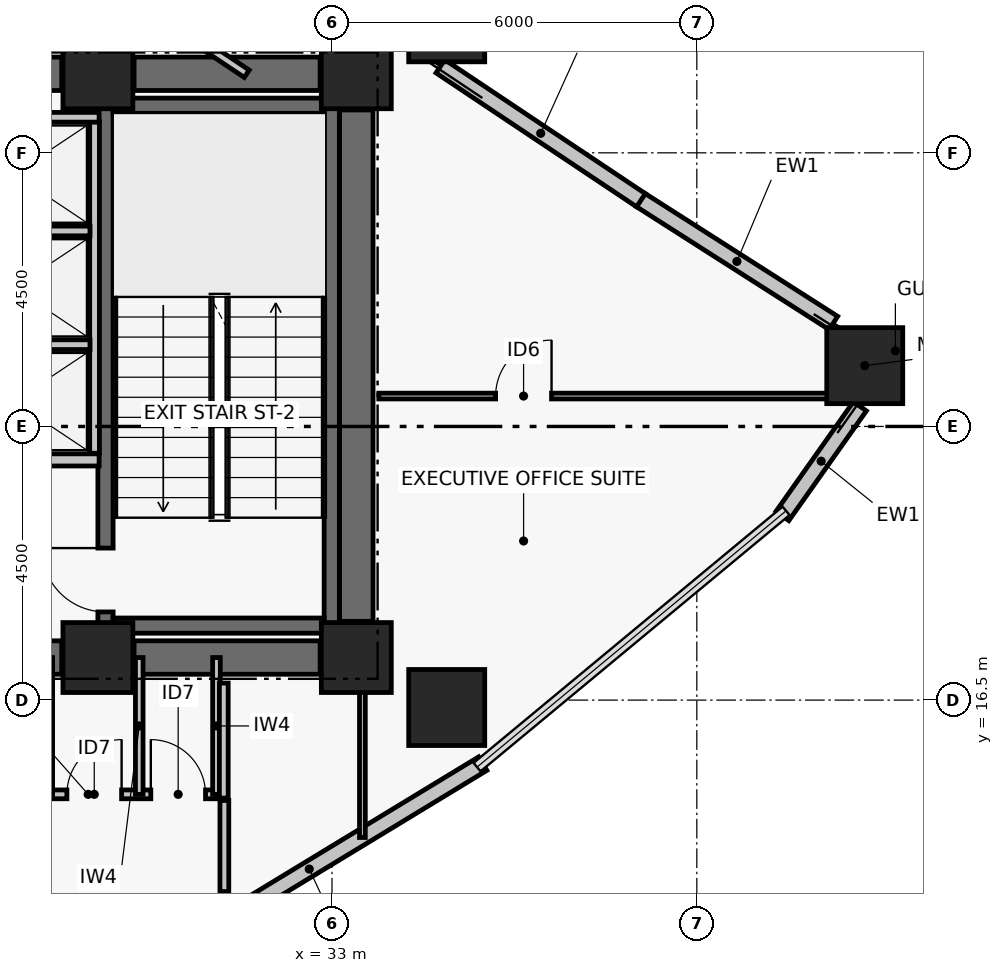
"""IFC4 building model, lengths in metres.
Left out: names, types, materials, properties, quantities, classifications, styles, units other than length and angle.
Written with IfcOpenShell. Run it as: python <this file> out.ifc"""

import sys

from ifc_helpers import new_model, si_unit, direction, frame, frame_2d, origin, origin_2d, place, context, subcontext, project, spatial, rectangle, hollow_rectangle, extrude, element, fill, save


model = new_model("IFC4")
c1 = context("Model", 3, precision=1e-05, world=origin(), true_north=direction((0.0, 1.0)))
c2 = subcontext(c1, "Body", "Model", "MODEL_VIEW")
j1 = project(units=[si_unit("LENGTHUNIT", "METRE"), si_unit("PLANEANGLEUNIT", "RADIAN")], contexts=[c1])
p1 = place(None, origin())
s1 = spatial("IfcSite", under=j1, at=p1, CompositionType="ELEMENT")
p2 = place(p1, origin())
s2 = spatial("IfcBuilding", under=s1, at=p2, CompositionType="ELEMENT")
p3 = place(p2, frame((0.0, 0.0, 111.42)))
s3 = spatial("IfcBuildingStorey", under=s2, at=p3, CompositionType="ELEMENT", Elevation=111.42)
for number, where, z_axis, x_axis in (
    (1, (29.15, 17.2, 0.0), (0.0, 0.0, 1.0), (1.0, 0.0, 0.0)),
    (2, (33.4, 17.2, 0.0), (0.0, 0.0, 1.0), (1.0, 0.0, 0.0)),
    (3, (29.15, 26.8, 0.0), (0.0, 0.0, 1.0), (1.0, 0.0, 0.0)),
    (4, (33.4, 26.8, 0.0), (0.0, 0.0, 1.0), (1.0, 0.0, 0.0)),
):
    element("IfcColumn", number, at=place(p3, frame(where, z_axis=z_axis, x_axis=x_axis)), inside=s3, PredefinedType="COLUMN", context=c2, shape_type="SweptSolid", body=[
        extrude(rectangle(XDim=1.15, YDim=1.15, at=origin_2d()), origin(), (0.0, 0.0, 1.0), 3.72),
    ])
p4 = place(p3, frame((26.85, 17.2, 0.0), z_axis=(0.0, 0.0, 1.0), x_axis=(1.0, 0.0, 0.0)))
e5 = element("IfcWall", 5, at=p4, inside=s3, PredefinedType="SHEAR", context=c2, shape_type="SweptSolid", body=[
    extrude(rectangle(XDim=1.705, YDim=0.55, at=frame_2d((0.853, 0.0))), origin(), (0.0, 0.0, 1.0), 3.47),
])
p5 = place(p3, frame((29.745, 17.2, 0.0), z_axis=(0.0, 0.0, 1.0), x_axis=(1.0, 0.0, 0.0)))
e6 = element("IfcWall", 6, at=p5, inside=s3, PredefinedType="SHEAR", context=c2, shape_type="SweptSolid", body=[
    extrude(rectangle(XDim=3.06, YDim=0.55, at=frame_2d((1.53, 0.0))), origin(), (0.0, 0.0, 1.0), 3.47),
])
p6 = place(p3, frame((26.85, 26.8, 0.0), z_axis=(0.0, 0.0, 1.0), x_axis=(1.0, 0.0, 0.0)))
e7 = element("IfcWall", 7, at=p6, inside=s3, PredefinedType="SHEAR", context=c2, shape_type="SweptSolid", body=[
    extrude(rectangle(XDim=1.705, YDim=0.55, at=frame_2d((0.853, 0.0))), origin(), (0.0, 0.0, 1.0), 3.47),
])
p7 = place(p3, frame((29.745, 26.8, 0.0), z_axis=(0.0, 0.0, 1.0), x_axis=(1.0, 0.0, 0.0)))
e8 = element("IfcWall", 8, at=p7, inside=s3, PredefinedType="SHEAR", context=c2, shape_type="SweptSolid", body=[
    extrude(rectangle(XDim=3.06, YDim=0.55, at=frame_2d((1.53, 0.0))), origin(), (0.0, 0.0, 1.0), 3.47),
])
p8 = place(p3, frame((33.4, 17.795, 0.0), z_axis=(0.0, 0.0, 1.0), x_axis=(0.0, 1.0, 0.0)))
e9 = element("IfcWall", 9, at=p8, inside=s3, PredefinedType="SHEAR", context=c2, shape_type="SweptSolid", body=[
    extrude(rectangle(XDim=8.41, YDim=0.55, at=frame_2d((4.205, 0.0))), origin(), (0.0, 0.0, 1.0), 3.47),
])
p9 = place(p3, frame((29.275, 17.6, 0.0), z_axis=(0.0, 0.0, 1.0), x_axis=(0.0, 1.0, 0.0)))
e10 = element("IfcWall", 10, at=p9, inside=s3, PredefinedType="SHEAR", context=c2, shape_type="SweptSolid", body=[
    extrude(rectangle(XDim=8.8, YDim=0.25, at=frame_2d((4.4, 0.0))), origin(), (0.0, 0.0, 1.0), 3.47),
])
p10 = place(p9, frame((0.35, 0.0, 0.0)))
e11 = element("IfcOpeningElement", 11, at=p10, cuts=e10, PredefinedType="OPENING", context=c2, shape_type="SweptSolid", body=[
    extrude(rectangle(XDim=1.05, YDim=2.08, at=frame_2d((0.525, 1.04))), frame((0.0, 0.135, 0.0), z_axis=(0.0, -1.0, 0.0), x_axis=(1.0, 0.0, 0.0)), (0.0, 0.0, 1.0), 0.27),
])
p11 = place(p3, frame((32.996, 17.6, 0.0), z_axis=(0.0, 0.0, 1.0), x_axis=(0.0, 1.0, 0.0)))
e12 = element("IfcWall", 12, at=p11, inside=s3, PredefinedType="SHEAR", context=c2, shape_type="SweptSolid", body=[
    extrude(rectangle(XDim=8.8, YDim=0.25, at=frame_2d((4.4, 0.0))), origin(), (0.0, 0.0, 1.0), 3.47),
])
for number, where, z_axis, x_axis in (
    (13, (29.4, 17.725, 0.0), (0.0, 0.0, 1.0), (1.0, 0.0, 0.0)),
    (14, (29.4, 26.275, 0.0), (0.0, 0.0, 1.0), (1.0, 0.0, 0.0)),
):
    element("IfcWall", number, at=place(p3, frame(where, z_axis=z_axis, x_axis=x_axis)), inside=s3, PredefinedType="SHEAR", context=c2, shape_type="SweptSolid", body=[
        extrude(rectangle(XDim=3.471, YDim=0.25, at=frame_2d((1.736, 0.0))), origin(), (0.0, 0.0, 1.0), 3.47),
    ])
for number, where, z_axis, x_axis in (
    (15, (41.762, 22.0, 0.0), (0.0, 0.0, 1.0), (1.0, 0.0, 0.0)),
    (16, (34.887, 27.622, 0.0), (0.0, 0.0, 1.0), (1.0, 0.0, 0.0)),
    (17, (34.887, 16.378, 0.0), (0.0, 0.0, 1.0), (1.0, 0.0, 0.0)),
):
    element("IfcColumn", number, at=place(p3, frame(where, z_axis=z_axis, x_axis=x_axis)), inside=s3, PredefinedType="COLUMN", context=c2, shape_type="SweptSolid", body=[
        extrude(hollow_rectangle(XDim=1.25, YDim=1.25, WallThickness=0.05, at=origin_2d()), origin(), (0.0, 0.0, 1.0), 3.72),
    ])
p12 = place(p3, frame((41.682, 21.331, 0.0), z_axis=(0.0, 0.0, 1.0), x_axis=(-0.577134204686, -0.816649318729, 0.0)))
e18 = element("IfcWall", 18, at=p12, inside=s3, PredefinedType="PARTITIONING", context=c2, shape_type="SweptSolid", body=[
    extrude(rectangle(XDim=2.21, YDim=0.26, at=frame_2d((1.105, 0.0))), origin(), (0.0, 0.0, 1.0), 3.47),
])
p13 = place(p3, frame((38.072, 24.727, 0.0), z_axis=(0.0, 0.0, 1.0), x_axis=(0.843033549628, -0.537860980367, 0.0)))
e19 = element("IfcWall", 19, at=p13, inside=s3, PredefinedType="PARTITIONING", context=c2, shape_type="SweptSolid", body=[
    extrude(rectangle(XDim=3.766, YDim=0.26, at=frame_2d((1.883, 0.0))), origin(), (0.0, 0.0, 1.0), 2.9),
])
p14 = place(p3, frame((34.783, 26.922, 0.0), z_axis=(0.0, 0.0, 1.0), x_axis=(0.831718676225, -0.555197301523, 0.0)))
e20 = element("IfcWall", 20, at=p14, inside=s3, PredefinedType="PARTITIONING", context=c2, shape_type="SweptSolid", body=[
    extrude(rectangle(XDim=3.966, YDim=0.26, at=frame_2d((1.983, 0.0))), origin(), (0.0, 0.0, 1.0), 2.77),
])
p15 = place(p3, frame((35.48, 15.455, 0.0), z_axis=(0.0, 0.0, 1.0), x_axis=(-0.854673977685, -0.51916509115, 0.0)))
e21 = element("IfcWall", 21, at=p15, inside=s3, PredefinedType="PARTITIONING", context=c2, shape_type="SweptSolid", body=[
    extrude(rectangle(XDim=6.678, YDim=0.26, at=frame_2d((3.339, 0.0))), origin(), (0.0, 0.0, 1.0), 3.47),
])
p16 = place(p3, frame((26.37, 20.45, 0.0), z_axis=(0.0, 0.0, 1.0), x_axis=(1.0, 0.0, 0.0)))
e22 = element("IfcWall", 22, at=p16, inside=s3, PredefinedType="PARTITIONING", context=c2, shape_type="SweptSolid", body=[
    extrude(rectangle(XDim=2.8, YDim=0.2, at=frame_2d((1.4, 0.0))), origin(), (0.0, 0.0, 1.0), 3.47),
])
p17 = place(p16, frame((0.78, 0.0, 0.0)))
e23 = element("IfcOpeningElement", 23, at=p17, cuts=e22, PredefinedType="OPENING", context=c2, shape_type="SweptSolid", body=[
    extrude(rectangle(XDim=1.1, YDim=2.08, at=frame_2d((0.55, 1.04))), frame((0.0, 0.11, 0.0), z_axis=(0.0, -1.0, 0.0), x_axis=(1.0, 0.0, 0.0)), (0.0, 0.0, 1.0), 0.22),
])
p18 = place(p3, frame((29.095, 20.56, 0.0), z_axis=(0.0, 0.0, 1.0), x_axis=(0.0, 1.0, 0.0)))
e24 = element("IfcWall", 24, at=p18, inside=s3, PredefinedType="PARTITIONING", context=c2, shape_type="SweptSolid", body=[
    extrude(rectangle(XDim=5.45, YDim=0.16, at=frame_2d((2.725, 0.0))), origin(), (0.0, 0.0, 1.0), 3.47),
])
p19 = place(p3, frame((26.37, 22.345, 0.0), z_axis=(0.0, 0.0, 1.0), x_axis=(1.0, 0.0, 0.0)))
e25 = element("IfcWall", 25, at=p19, inside=s3, PredefinedType="PARTITIONING", context=c2, shape_type="SweptSolid", body=[
    extrude(rectangle(XDim=2.65, YDim=0.16, at=frame_2d((1.325, 0.0))), origin(), (0.0, 0.0, 1.0), 3.47),
])
p20 = place(p3, frame((26.53, 24.215, 0.0), z_axis=(0.0, 0.0, 1.0), x_axis=(1.0, 0.0, 0.0)))
e26 = element("IfcWall", 26, at=p20, inside=s3, PredefinedType="PARTITIONING", context=c2, shape_type="SweptSolid", body=[
    extrude(rectangle(XDim=2.49, YDim=0.16, at=frame_2d((1.245, 0.0))), origin(), (0.0, 0.0, 1.0), 3.47),
])
p21 = place(p3, frame((26.34, 26.085, 0.0), z_axis=(0.0, 0.0, 1.0), x_axis=(1.0, 0.0, 0.0)))
e27 = element("IfcWall", 27, at=p21, inside=s3, PredefinedType="PARTITIONING", context=c2, shape_type="SweptSolid", body=[
    extrude(rectangle(XDim=2.83, YDim=0.16, at=frame_2d((1.415, 0.0))), origin(), (0.0, 0.0, 1.0), 3.47),
])
p22 = place(p3, frame((26.88, 14.95, 0.0), z_axis=(0.0, 0.0, 1.0), x_axis=(1.0, 0.0, 0.0)))
e28 = element("IfcWall", 28, at=p22, inside=s3, PredefinedType="PARTITIONING", context=c2, shape_type="SweptSolid", body=[
    extrude(rectangle(XDim=4.22, YDim=0.145, at=frame_2d((2.11, 0.0))), origin(), (0.0, 0.0, 1.0), 3.05),
])
p23 = place(p22, frame((0.28, 0.0, 0.0)))
e29 = element("IfcOpeningElement", 29, at=p23, cuts=e28, PredefinedType="OPENING", context=c2, shape_type="SweptSolid", body=[
    extrude(rectangle(XDim=0.9, YDim=2.02, at=frame_2d((0.45, 1.01))), frame((0.0, 0.083, 0.0), z_axis=(0.0, -1.0, 0.0), x_axis=(1.0, 0.0, 0.0)), (0.0, 0.0, 1.0), 0.165),
])
p24 = place(p22, frame((1.76, 0.0, 0.0)))
e30 = element("IfcOpeningElement", 30, at=p24, cuts=e28, PredefinedType="OPENING", context=c2, shape_type="SweptSolid", body=[
    extrude(rectangle(XDim=0.9, YDim=2.02, at=frame_2d((0.45, 1.01))), frame((0.0, 0.083, 0.0), z_axis=(0.0, -1.0, 0.0), x_axis=(1.0, 0.0, 0.0)), (0.0, 0.0, 1.0), 0.165),
])
p25 = place(p22, frame((3.14, 0.0, 0.0)))
e31 = element("IfcOpeningElement", 31, at=p25, cuts=e28, PredefinedType="OPENING", context=c2, shape_type="SweptSolid", body=[
    extrude(rectangle(XDim=0.9, YDim=2.02, at=frame_2d((0.45, 1.01))), frame((0.0, 0.083, 0.0), z_axis=(0.0, -1.0, 0.0), x_axis=(1.0, 0.0, 0.0)), (0.0, 0.0, 1.0), 0.165),
])
p26 = place(p3, frame((28.35, 14.95, 0.0), z_axis=(0.0, 0.0, 1.0), x_axis=(0.0, 1.0, 0.0)))
e32 = element("IfcWall", 32, at=p26, inside=s3, PredefinedType="PARTITIONING", context=c2, shape_type="SweptSolid", body=[
    extrude(rectangle(XDim=2.25, YDim=0.11, at=frame_2d((1.125, 0.0))), origin(), (0.0, 0.0, 1.0), 2.6),
])
for number, where, z_axis, x_axis in (
    (33, (29.83, 14.95, 0.0), (0.0, 0.0, 1.0), (0.0, 1.0, 0.0)),
    (34, (31.1, 14.95, 0.0), (0.0, 0.0, 1.0), (0.0, 1.0, 0.0)),
):
    element("IfcWall", number, at=place(p3, frame(where, z_axis=z_axis, x_axis=x_axis)), inside=s3, PredefinedType="PARTITIONING", context=c2, shape_type="SweptSolid", body=[
        extrude(rectangle(XDim=2.25, YDim=0.125, at=frame_2d((1.125, 0.0))), origin(), (0.0, 0.0, 1.0), 2.6),
    ])
p27 = place(p3, frame((31.23, 13.351, 0.0), z_axis=(0.0, 0.0, 1.0), x_axis=(0.0, 1.0, 0.0)))
e35 = element("IfcWall", 35, at=p27, inside=s3, PredefinedType="PARTITIONING", context=c2, shape_type="SweptSolid", body=[
    extrude(rectangle(XDim=1.499, YDim=0.145, at=frame_2d((0.75, 0.0))), origin(), (0.0, 0.0, 1.0), 2.9),
])
p28 = place(p3, frame((31.22, 14.889, 0.0), z_axis=(0.0, 0.0, 1.0), x_axis=(0.0, 1.0, 0.0)))
e36 = element("IfcWall", 36, at=p28, inside=s3, PredefinedType="PARTITIONING", context=c2, shape_type="SweptSolid", body=[
    extrude(rectangle(XDim=1.891, YDim=0.145, at=frame_2d((0.946, 0.0))), origin(), (0.0, 0.0, 1.0), 2.6),
])
p29 = place(p3, frame((31.598, 26.8, 0.0), z_axis=(0.0, 0.0, 1.0), x_axis=(-0.831758510993, 0.555137622028, 0.0)))
e37 = element("IfcWall", 37, at=p29, inside=s3, PredefinedType="PARTITIONING", context=c2, shape_type="SweptSolid", body=[
    extrude(rectangle(XDim=2.833, YDim=0.145, at=frame_2d((1.417, 0.0))), origin(), (0.0, 0.0, 1.0), 2.6),
])
p30 = place(p3, frame((33.5, 14.241, 0.0), z_axis=(0.0, 0.0, 1.0), x_axis=(0.0, 1.0, 0.0)))
e38 = element("IfcWall", 38, at=p30, inside=s3, PredefinedType="PARTITIONING", context=c2, shape_type="SweptSolid", body=[
    extrude(rectangle(XDim=2.589, YDim=0.095, at=frame_2d((1.295, 0.0))), origin(), (0.0, 0.0, 1.0), 2.6),
])
p31 = place(p3, frame((33.77, 21.5, 0.0), z_axis=(0.0, 0.0, 1.0), x_axis=(1.0, 0.0, 0.0)))
e39 = element("IfcWall", 39, at=p31, inside=s3, PredefinedType="PARTITIONING", context=c2, shape_type="SweptSolid", body=[
    extrude(rectangle(XDim=8.044, YDim=0.095, at=frame_2d((4.022, 0.0))), origin(), (0.0, 0.0, 1.0), 2.6),
])
p32 = place(p31, frame((1.921, 0.0, 0.0)))
e40 = element("IfcOpeningElement", 40, at=p32, cuts=e39, PredefinedType="OPENING", context=c2, shape_type="SweptSolid", body=[
    extrude(rectangle(XDim=0.92, YDim=2.05, at=frame_2d((0.46, 1.025))), frame((0.0, 0.057, 0.0), z_axis=(0.0, -1.0, 0.0), x_axis=(1.0, 0.0, 0.0)), (0.0, 0.0, 1.0), 0.115),
])
p33 = place(p10, origin())
e41 = element("IfcDoor", 41, at=p33, inside=s3, OperationType="SINGLE_SWING_RIGHT", PredefinedType="DOOR", context=c2, shape_type="SweptSolid", body=[
    extrude(rectangle(XDim=1.05, YDim=2.08, at=frame_2d((0.525, 1.04))), frame((0.0, 0.025, 0.0), z_axis=(0.0, -1.0, 0.0), x_axis=(1.0, 0.0, 0.0)), (0.0, 0.0, 1.0), 0.05),
])
fill(e11, e41)
p34 = place(p24, origin())
e42 = element("IfcDoor", 42, at=p34, inside=s3, OperationType="SINGLE_SWING_RIGHT", PredefinedType="DOOR", context=c2, shape_type="SweptSolid", body=[
    extrude(rectangle(XDim=0.9, YDim=2.02, at=frame_2d((0.45, 1.01))), frame((0.0, 0.025, 0.0), z_axis=(0.0, -1.0, 0.0), x_axis=(1.0, 0.0, 0.0)), (0.0, 0.0, 1.0), 0.05),
])
fill(e30, e42)
p35 = place(p25, origin())
e43 = element("IfcDoor", 43, at=p35, inside=s3, OperationType="SINGLE_SWING_LEFT", PredefinedType="DOOR", context=c2, shape_type="SweptSolid", body=[
    extrude(rectangle(XDim=0.9, YDim=2.02, at=frame_2d((0.45, 1.01))), frame((0.0, 0.025, 0.0), z_axis=(0.0, -1.0, 0.0), x_axis=(1.0, 0.0, 0.0)), (0.0, 0.0, 1.0), 0.05),
])
fill(e31, e43)
p36 = place(p32, origin())
e44 = element("IfcDoor", 44, at=p36, inside=s3, OperationType="SINGLE_SWING_RIGHT", PredefinedType="DOOR", context=c2, shape_type="SweptSolid", body=[
    extrude(rectangle(XDim=0.92, YDim=2.05, at=frame_2d((0.46, 1.025))), frame((0.0, 0.025, 0.0), z_axis=(0.0, -1.0, 0.0), x_axis=(1.0, 0.0, 0.0)), (0.0, 0.0, 1.0), 0.05),
])
fill(e40, e44)
save(model, sys.argv[1])
